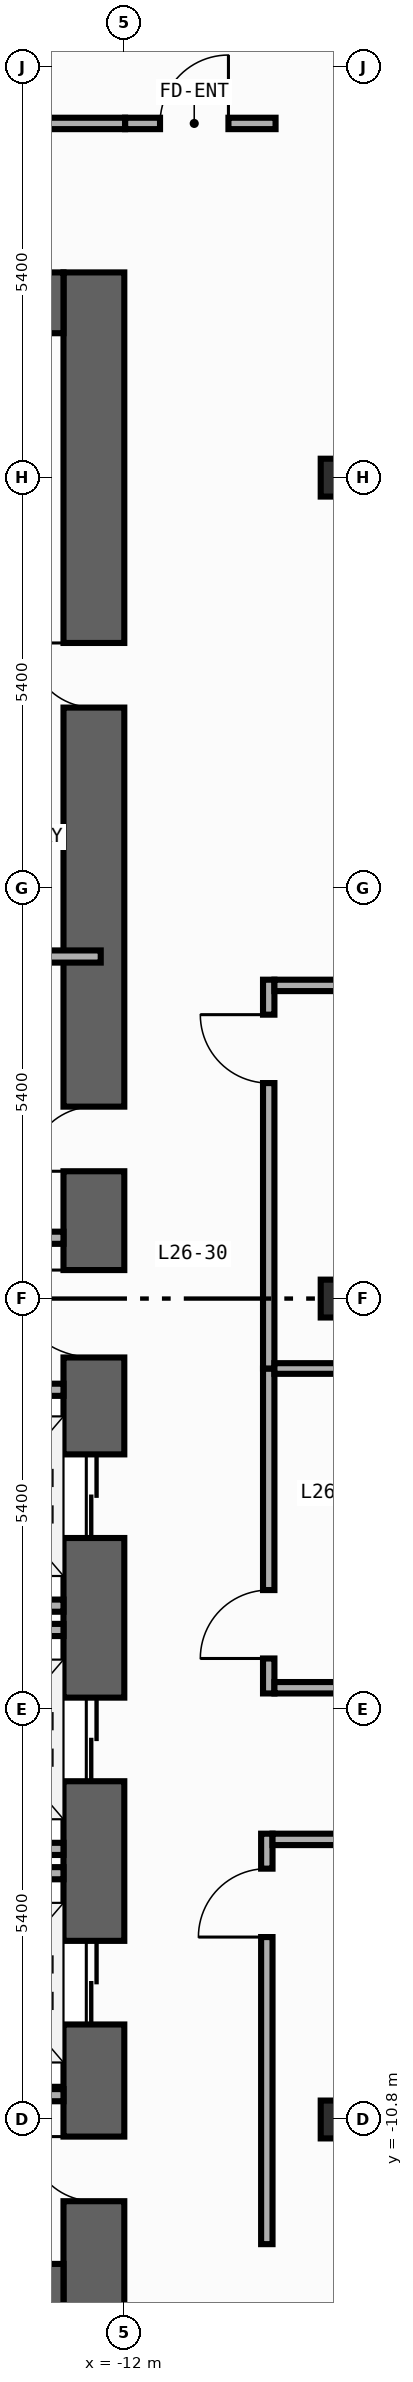
"""IFC4 building model, lengths in metres.
Left out: names, types, materials, properties, quantities, classifications, styles, units other than length and angle.
Written with IfcOpenShell. Run it as: python <this file> out.ifc"""

import sys

from ifc_helpers import new_model, si_unit, direction, frame, frame_2d, origin, origin_2d, place, context, subcontext, project, spatial, rectangle, i_section, extrude, element, fill, save


model = new_model("IFC4")
c1 = context("Model", 3, precision=1e-05, world=origin(), true_north=direction((0.0, 1.0)))
c2 = subcontext(c1, "Body", "Model", "MODEL_VIEW")
j1 = project(units=[si_unit("LENGTHUNIT", "METRE"), si_unit("PLANEANGLEUNIT", "RADIAN")], contexts=[c1])
p1 = place(None, origin())
s1 = spatial("IfcSite", under=j1, at=p1, CompositionType="ELEMENT")
p2 = place(p1, origin())
s2 = spatial("IfcBuilding", under=s1, at=p2, CompositionType="ELEMENT")
p3 = place(p2, frame((0.0, 0.0, 114.2)))
s3 = spatial("IfcBuildingStorey", under=s2, at=p3, CompositionType="ELEMENT", Elevation=114.2)
p4 = place(p3, frame((-12.4, -13.5, 0.0), z_axis=(0.0, 0.0, 1.0), x_axis=(0.0, 1.0, 0.0)))
e1 = element("IfcWall", 1, at=p4, inside=s3, PredefinedType="SHEAR", context=c2, shape_type="SweptSolid", body=[
    extrude(rectangle(XDim=27.0, YDim=0.8, at=frame_2d((13.5, 0.0))), origin(), (0.0, 0.0, 1.0), 3.94),
])
p5 = place(p4, frame((10.35, 0.0, 0.0)))
e2 = element("IfcOpeningElement", 2, at=p5, cuts=e1, PredefinedType="OPENING", context=c2, shape_type="SweptSolid", body=[
    extrude(rectangle(XDim=1.1, YDim=2.2, at=frame_2d((0.55, 1.1))), frame((0.0, 0.41, 0.0), z_axis=(0.0, -1.0, 0.0), x_axis=(1.0, 0.0, 0.0)), (0.0, 0.0, 1.0), 0.82),
])
p6 = place(p4, frame((7.15, 0.0, 0.0)))
e3 = element("IfcOpeningElement", 3, at=p6, cuts=e1, PredefinedType="OPENING", context=c2, shape_type="SweptSolid", body=[
    extrude(rectangle(XDim=1.1, YDim=2.2, at=frame_2d((0.55, 1.1))), frame((0.0, 0.41, 0.0), z_axis=(0.0, -1.0, 0.0), x_axis=(1.0, 0.0, 0.0)), (0.0, 0.0, 1.0), 0.82),
])
p7 = place(p4, frame((3.95, 0.0, 0.0)))
e4 = element("IfcOpeningElement", 4, at=p7, cuts=e1, PredefinedType="OPENING", context=c2, shape_type="SweptSolid", body=[
    extrude(rectangle(XDim=1.1, YDim=2.2, at=frame_2d((0.55, 1.1))), frame((0.0, 0.41, 0.0), z_axis=(0.0, -1.0, 0.0), x_axis=(1.0, 0.0, 0.0)), (0.0, 0.0, 1.0), 0.82),
])
p8 = place(p4, frame((15.175, 0.0, 0.0)))
e5 = element("IfcOpeningElement", 5, at=p8, cuts=e1, PredefinedType="OPENING", context=c2, shape_type="SweptSolid", body=[
    extrude(rectangle(XDim=0.85, YDim=2.1, at=frame_2d((0.425, 1.05))), frame((0.0, 0.41, 0.0), z_axis=(0.0, -1.0, 0.0), x_axis=(1.0, 0.0, 0.0)), (0.0, 0.0, 1.0), 0.82),
])
p9 = place(p4, frame((21.275, 0.0, 0.0)))
e6 = element("IfcOpeningElement", 6, at=p9, cuts=e1, PredefinedType="OPENING", context=c2, shape_type="SweptSolid", body=[
    extrude(rectangle(XDim=0.85, YDim=2.1, at=frame_2d((0.425, 1.05))), frame((0.0, 0.41, 0.0), z_axis=(0.0, -1.0, 0.0), x_axis=(1.0, 0.0, 0.0)), (0.0, 0.0, 1.0), 0.82),
])
p10 = place(p4, frame((12.725, 0.0, 0.0)))
e7 = element("IfcOpeningElement", 7, at=p10, cuts=e1, PredefinedType="OPENING", context=c2, shape_type="SweptSolid", body=[
    extrude(rectangle(XDim=1.15, YDim=2.2, at=frame_2d((0.575, 1.1))), frame((0.0, 0.41, 0.0), z_axis=(0.0, -1.0, 0.0), x_axis=(1.0, 0.0, 0.0)), (0.0, 0.0, 1.0), 0.82),
])
p11 = place(p4, frame((1.625, 0.0, 0.0)))
e8 = element("IfcOpeningElement", 8, at=p11, cuts=e1, PredefinedType="OPENING", context=c2, shape_type="SweptSolid", body=[
    extrude(rectangle(XDim=0.85, YDim=2.1, at=frame_2d((0.425, 1.05))), frame((0.0, 0.41, 0.0), z_axis=(0.0, -1.0, 0.0), x_axis=(1.0, 0.0, 0.0)), (0.0, 0.0, 1.0), 0.82),
])
for number, where, z_axis, x_axis in (
    (9, (-19.6, -13.1, 0.0), (0.0, 0.0, 1.0), (1.0, 0.0, 0.0)),
    (10, (-19.6, 13.1, 0.0), (0.0, 0.0, 1.0), (1.0, 0.0, 0.0)),
):
    element("IfcWall", number, at=place(p3, frame(where, z_axis=z_axis, x_axis=x_axis)), inside=s3, PredefinedType="SHEAR", context=c2, shape_type="SweptSolid", body=[
        extrude(rectangle(XDim=6.8, YDim=0.8, at=frame_2d((3.4, 0.0))), origin(), (0.0, 0.0, 1.0), 3.94),
    ])
for number, where, z_axis, x_axis in (
    (11, (-9.2, -10.8, 0.0), (0.0, 0.0, 1.0), (1.0, 0.0, 0.0)),
    (12, (-9.2, 0.0, 0.0), (0.0, 0.0, 1.0), (1.0, 0.0, 0.0)),
    (13, (-9.2, 10.8, 0.0), (0.0, 0.0, 1.0), (1.0, 0.0, 0.0)),
):
    element("IfcColumn", number, at=place(p3, frame(where, z_axis=z_axis, x_axis=x_axis)), inside=s3, PredefinedType="COLUMN", context=c2, shape_type="SweptSolid", body=[
        extrude(i_section(OverallWidth=0.432, OverallDepth=0.498, WebThickness=0.045, FlangeThickness=0.07, FilletRadius=0.022, at=origin_2d()), origin(), (0.0, 0.0, 1.0), 4.2),
    ])
for number, where, z_axis, x_axis in (
    (14, (-14.99, -4.04, 0.0), (0.0, 0.0, 1.0), (1.0, 0.0, 0.0)),
    (15, (-14.99, -7.24, 0.0), (0.0, 0.0, 1.0), (1.0, 0.0, 0.0)),
    (16, (-14.99, -4.36, 0.0), (0.0, 0.0, 1.0), (1.0, 0.0, 0.0)),
    (17, (-14.99, -7.56, 0.0), (0.0, 0.0, 1.0), (1.0, 0.0, 0.0)),
):
    element("IfcWall", number, at=place(p3, frame(where, z_axis=z_axis, x_axis=x_axis)), inside=s3, PredefinedType="STANDARD", context=c2, shape_type="SweptSolid", body=[
        extrude(rectangle(XDim=2.19, YDim=0.16, at=frame_2d((1.095, 0.0))), origin(), (0.0, 0.0, 1.0), 3.94),
    ])
for number, where, z_axis, x_axis in (
    (18, (-15.4, 0.8, 0.0), (0.0, 0.0, 1.0), (1.0, 0.0, 0.0)),
    (19, (-15.4, -1.2, 0.0), (0.0, 0.0, 1.0), (1.0, 0.0, 0.0)),
    (20, (-15.4, -10.48, 0.0), (0.0, 0.0, 1.0), (1.0, 0.0, 0.0)),
):
    element("IfcWall", number, at=place(p3, frame(where, z_axis=z_axis, x_axis=x_axis)), inside=s3, PredefinedType="STANDARD", context=c2, shape_type="SweptSolid", body=[
        extrude(rectangle(XDim=2.6, YDim=0.16, at=frame_2d((1.3, 0.0))), origin(), (0.0, 0.0, 1.0), 3.94),
    ])
p12 = place(p3, frame((-15.375, 4.5, 0.0), z_axis=(0.0, 0.0, 1.0), x_axis=(1.0, 0.0, 0.0)))
e21 = element("IfcWall", 21, at=p12, inside=s3, PredefinedType="PARTITIONING", context=c2, shape_type="SweptSolid", body=[
    extrude(rectangle(XDim=3.065, YDim=0.16, at=frame_2d((1.532, 0.0))), origin(), (0.0, 0.0, 1.0), 3.94),
])
p13 = place(p3, frame((-11.99, 15.46, 0.0), z_axis=(0.0, 0.0, 1.0), x_axis=(1.0, 0.0, 0.0)))
e22 = element("IfcWall", 22, at=p13, inside=s3, PredefinedType="PARTITIONING", context=c2, shape_type="SweptSolid", body=[
    extrude(rectangle(XDim=1.98, YDim=0.15, at=frame_2d((0.99, 0.0))), origin(), (0.0, 0.0, 1.0), 3.94),
])
p14 = place(p13, frame((0.46, 0.0, 0.0)))
e23 = element("IfcOpeningElement", 23, at=p14, cuts=e22, PredefinedType="OPENING", context=c2, shape_type="SweptSolid", body=[
    extrude(rectangle(XDim=0.9, YDim=2.15, at=frame_2d((0.45, 1.075))), frame((0.0, 0.085, 0.0), z_axis=(0.0, -1.0, 0.0), x_axis=(1.0, 0.0, 0.0)), (0.0, 0.0, 1.0), 0.17),
])
p15 = place(p3, frame((-10.1, -5.195, 0.0), z_axis=(0.0, 0.0, 1.0), x_axis=(0.0, 1.0, 0.0)))
e24 = element("IfcWall", 24, at=p15, inside=s3, PredefinedType="PARTITIONING", context=c2, shape_type="SweptSolid", body=[
    extrude(rectangle(XDim=4.275, YDim=0.15, at=frame_2d((2.138, 0.0))), origin(), (0.0, 0.0, 1.0), 3.94),
])
p16 = place(p15, frame((0.46, 0.0, 0.0)))
e25 = element("IfcOpeningElement", 25, at=p16, cuts=e24, PredefinedType="OPENING", context=c2, shape_type="SweptSolid", body=[
    extrude(rectangle(XDim=0.9, YDim=2.15, at=frame_2d((0.45, 1.075))), frame((0.0, 0.085, 0.0), z_axis=(0.0, -1.0, 0.0), x_axis=(1.0, 0.0, 0.0)), (0.0, 0.0, 1.0), 0.17),
])
p17 = place(p3, frame((-10.1, -0.92, 0.0), z_axis=(0.0, 0.0, 1.0), x_axis=(0.0, 1.0, 0.0)))
e26 = element("IfcWall", 26, at=p17, inside=s3, PredefinedType="PARTITIONING", context=c2, shape_type="SweptSolid", body=[
    extrude(rectangle(XDim=5.115, YDim=0.15, at=frame_2d((2.558, 0.0))), origin(), (0.0, 0.0, 1.0), 3.94),
])
p18 = place(p17, frame((3.755, 0.0, 0.0)))
e27 = element("IfcOpeningElement", 27, at=p18, cuts=e26, PredefinedType="OPENING", context=c2, shape_type="SweptSolid", body=[
    extrude(rectangle(XDim=0.9, YDim=2.15, at=frame_2d((0.45, 1.075))), frame((0.0, 0.085, 0.0), z_axis=(0.0, -1.0, 0.0), x_axis=(1.0, 0.0, 0.0)), (0.0, 0.0, 1.0), 0.17),
])
p19 = place(p3, frame((-10.125, -12.44, 0.0), z_axis=(0.0, 0.0, 1.0), x_axis=(0.0, 1.0, 0.0)))
e28 = element("IfcWall", 28, at=p19, inside=s3, PredefinedType="PARTITIONING", context=c2, shape_type="SweptSolid", body=[
    extrude(rectangle(XDim=5.4, YDim=0.15, at=frame_2d((2.7, 0.0))), origin(), (0.0, 0.0, 1.0), 3.94),
])
p20 = place(p19, frame((4.04, 0.0, 0.0)))
e29 = element("IfcOpeningElement", 29, at=p20, cuts=e28, PredefinedType="OPENING", context=c2, shape_type="SweptSolid", body=[
    extrude(rectangle(XDim=0.9, YDim=2.15, at=frame_2d((0.45, 1.075))), frame((0.0, 0.085, 0.0), z_axis=(0.0, -1.0, 0.0), x_axis=(1.0, 0.0, 0.0)), (0.0, 0.0, 1.0), 0.17),
])
p21 = place(p3, frame((-10.025, 4.12, 0.0), z_axis=(0.0, 0.0, 1.0), x_axis=(1.0, 0.0, 0.0)))
e30 = element("IfcWall", 30, at=p21, inside=s3, PredefinedType="PARTITIONING", context=c2, shape_type="SweptSolid", body=[
    extrude(rectangle(XDim=11.82, YDim=0.15, at=frame_2d((5.91, 0.0))), origin(), (0.0, 0.0, 1.0), 3.94),
])
p22 = place(p21, frame((9.644, 0.0, 0.0)))
e31 = element("IfcOpeningElement", 31, at=p22, cuts=e30, PredefinedType="OPENING", context=c2, shape_type="SweptSolid", body=[
    extrude(rectangle(XDim=0.9, YDim=2.15, at=frame_2d((0.45, 1.075))), frame((0.0, 0.085, 0.0), z_axis=(0.0, -1.0, 0.0), x_axis=(1.0, 0.0, 0.0)), (0.0, 0.0, 1.0), 0.17),
])
p23 = place(p3, frame((-10.025, -5.12, 0.0), z_axis=(0.0, 0.0, 1.0), x_axis=(1.0, 0.0, 0.0)))
e32 = element("IfcWall", 32, at=p23, inside=s3, PredefinedType="PARTITIONING", context=c2, shape_type="SweptSolid", body=[
    extrude(rectangle(XDim=4.465, YDim=0.15, at=frame_2d((2.232, 0.0))), origin(), (0.0, 0.0, 1.0), 3.94),
])
p24 = place(p23, frame((3.105, 0.0, 0.0)))
e33 = element("IfcOpeningElement", 33, at=p24, cuts=e32, PredefinedType="OPENING", context=c2, shape_type="SweptSolid", body=[
    extrude(rectangle(XDim=0.9, YDim=2.15, at=frame_2d((0.45, 1.075))), frame((0.0, 0.085, 0.0), z_axis=(0.0, -1.0, 0.0), x_axis=(1.0, 0.0, 0.0)), (0.0, 0.0, 1.0), 0.17),
])
p25 = place(p3, frame((-10.05, -7.115, 0.0), z_axis=(0.0, 0.0, 1.0), x_axis=(1.0, 0.0, 0.0)))
e34 = element("IfcWall", 34, at=p25, inside=s3, PredefinedType="PARTITIONING", context=c2, shape_type="SweptSolid", body=[
    extrude(rectangle(XDim=8.265, YDim=0.15, at=frame_2d((4.133, 0.0))), origin(), (0.0, 0.0, 1.0), 3.94),
])
p26 = place(p25, frame((6.905, 0.0, 0.0)))
e35 = element("IfcOpeningElement", 35, at=p26, cuts=e34, PredefinedType="OPENING", context=c2, shape_type="SweptSolid", body=[
    extrude(rectangle(XDim=0.9, YDim=2.15, at=frame_2d((0.45, 1.075))), frame((0.0, 0.085, 0.0), z_axis=(0.0, -1.0, 0.0), x_axis=(1.0, 0.0, 0.0)), (0.0, 0.0, 1.0), 0.17),
])
p27 = place(p3, frame((-20.64, 15.46, 0.0), z_axis=(0.0, 0.0, 1.0), x_axis=(1.0, 0.0, 0.0)))
e36 = element("IfcWall", 36, at=p27, inside=s3, PredefinedType="PARTITIONING", context=c2, shape_type="SweptSolid", body=[
    extrude(rectangle(XDim=8.65, YDim=0.15, at=frame_2d((4.325, 0.0))), origin(), (0.0, 0.0, 1.0), 3.94),
])
p28 = place(p27, frame((2.871, 0.0, 0.0)))
e37 = element("IfcOpeningElement", 37, at=p28, cuts=e36, PredefinedType="OPENING", context=c2, shape_type="SweptSolid", body=[
    extrude(rectangle(XDim=0.9, YDim=2.15, at=frame_2d((0.45, 1.075))), frame((0.0, 0.085, 0.0), z_axis=(0.0, -1.0, 0.0), x_axis=(1.0, 0.0, 0.0)), (0.0, 0.0, 1.0), 0.17),
])
p29 = place(p3, frame((-10.025, -0.92, 0.0), z_axis=(0.0, 0.0, 1.0), x_axis=(1.0, 0.0, 0.0)))
e38 = element("IfcWall", 38, at=p29, inside=s3, PredefinedType="PARTITIONING", context=c2, shape_type="SweptSolid", body=[
    extrude(rectangle(XDim=4.465, YDim=0.14, at=frame_2d((2.232, 0.0))), origin(), (0.0, 0.0, 1.0), 3.94),
])
p30 = place(p5, origin())
e39 = element("IfcDoor", 39, at=p30, inside=s3, OperationType="DOUBLE_DOOR_SLIDING", PredefinedType="DOOR", context=c2, shape_type="SweptSolid", body=[
    extrude(rectangle(XDim=1.1, YDim=2.2, at=frame_2d((0.55, 1.1))), frame((0.0, 0.025, 0.0), z_axis=(0.0, -1.0, 0.0), x_axis=(1.0, 0.0, 0.0)), (0.0, 0.0, 1.0), 0.05),
])
fill(e2, e39)
p31 = place(p6, origin())
e40 = element("IfcDoor", 40, at=p31, inside=s3, OperationType="DOUBLE_DOOR_SLIDING", PredefinedType="DOOR", context=c2, shape_type="SweptSolid", body=[
    extrude(rectangle(XDim=1.1, YDim=2.2, at=frame_2d((0.55, 1.1))), frame((0.0, 0.025, 0.0), z_axis=(0.0, -1.0, 0.0), x_axis=(1.0, 0.0, 0.0)), (0.0, 0.0, 1.0), 0.05),
])
fill(e3, e40)
p32 = place(p7, origin())
e41 = element("IfcDoor", 41, at=p32, inside=s3, OperationType="DOUBLE_DOOR_SLIDING", PredefinedType="DOOR", context=c2, shape_type="SweptSolid", body=[
    extrude(rectangle(XDim=1.1, YDim=2.2, at=frame_2d((0.55, 1.1))), frame((0.0, 0.025, 0.0), z_axis=(0.0, -1.0, 0.0), x_axis=(1.0, 0.0, 0.0)), (0.0, 0.0, 1.0), 0.05),
])
fill(e4, e41)
p33 = place(p8, origin())
e42 = element("IfcDoor", 42, at=p33, inside=s3, OperationType="SINGLE_SWING_LEFT", PredefinedType="DOOR", context=c2, shape_type="SweptSolid", body=[
    extrude(rectangle(XDim=0.85, YDim=2.1, at=frame_2d((0.425, 1.05))), frame((0.0, 0.025, 0.0), z_axis=(0.0, -1.0, 0.0), x_axis=(1.0, 0.0, 0.0)), (0.0, 0.0, 1.0), 0.05),
])
fill(e5, e42)
p34 = place(p9, origin())
e43 = element("IfcDoor", 43, at=p34, inside=s3, OperationType="SINGLE_SWING_RIGHT", PredefinedType="DOOR", context=c2, shape_type="SweptSolid", body=[
    extrude(rectangle(XDim=0.85, YDim=2.1, at=frame_2d((0.425, 1.05))), frame((0.0, 0.025, 0.0), z_axis=(0.0, -1.0, 0.0), x_axis=(1.0, 0.0, 0.0)), (0.0, 0.0, 1.0), 0.05),
])
fill(e6, e43)
p35 = place(p10, origin())
e44 = element("IfcDoor", 44, at=p35, inside=s3, OperationType="SINGLE_SWING_RIGHT", PredefinedType="DOOR", context=c2, shape_type="SweptSolid", body=[
    extrude(rectangle(XDim=1.15, YDim=2.2, at=frame_2d((0.575, 1.1))), frame((0.0, 0.025, 0.0), z_axis=(0.0, -1.0, 0.0), x_axis=(1.0, 0.0, 0.0)), (0.0, 0.0, 1.0), 0.05),
])
fill(e7, e44)
p36 = place(p11, origin())
e45 = element("IfcDoor", 45, at=p36, inside=s3, OperationType="SINGLE_SWING_RIGHT", PredefinedType="DOOR", context=c2, shape_type="SweptSolid", body=[
    extrude(rectangle(XDim=0.85, YDim=2.1, at=frame_2d((0.425, 1.05))), frame((0.0, 0.025, 0.0), z_axis=(0.0, -1.0, 0.0), x_axis=(1.0, 0.0, 0.0)), (0.0, 0.0, 1.0), 0.05),
])
fill(e8, e45)
p37 = place(p14, origin())
e46 = element("IfcDoor", 46, at=p37, inside=s3, OperationType="SINGLE_SWING_RIGHT", PredefinedType="DOOR", context=c2, shape_type="SweptSolid", body=[
    extrude(rectangle(XDim=0.9, YDim=2.15, at=frame_2d((0.45, 1.075))), frame((0.0, 0.025, 0.0), z_axis=(0.0, -1.0, 0.0), x_axis=(1.0, 0.0, 0.0)), (0.0, 0.0, 1.0), 0.05),
])
fill(e23, e46)
p38 = place(p16, origin())
e47 = element("IfcDoor", 47, at=p38, inside=s3, OperationType="SINGLE_SWING_LEFT", PredefinedType="DOOR", context=c2, shape_type="SweptSolid", body=[
    extrude(rectangle(XDim=0.9, YDim=2.15, at=frame_2d((0.45, 1.075))), frame((0.0, 0.025, 0.0), z_axis=(0.0, -1.0, 0.0), x_axis=(1.0, 0.0, 0.0)), (0.0, 0.0, 1.0), 0.05),
])
fill(e25, e47)
p39 = place(p18, origin())
e48 = element("IfcDoor", 48, at=p39, inside=s3, OperationType="SINGLE_SWING_RIGHT", PredefinedType="DOOR", context=c2, shape_type="SweptSolid", body=[
    extrude(rectangle(XDim=0.9, YDim=2.15, at=frame_2d((0.45, 1.075))), frame((0.0, 0.025, 0.0), z_axis=(0.0, -1.0, 0.0), x_axis=(1.0, 0.0, 0.0)), (0.0, 0.0, 1.0), 0.05),
])
fill(e27, e48)
p40 = place(p20, origin())
e49 = element("IfcDoor", 49, at=p40, inside=s3, OperationType="SINGLE_SWING_LEFT", PredefinedType="DOOR", context=c2, shape_type="SweptSolid", body=[
    extrude(rectangle(XDim=0.9, YDim=2.15, at=frame_2d((0.45, 1.075))), frame((0.0, 0.025, 0.0), z_axis=(0.0, -1.0, 0.0), x_axis=(1.0, 0.0, 0.0)), (0.0, 0.0, 1.0), 0.05),
])
fill(e29, e49)
save(model, sys.argv[1])
